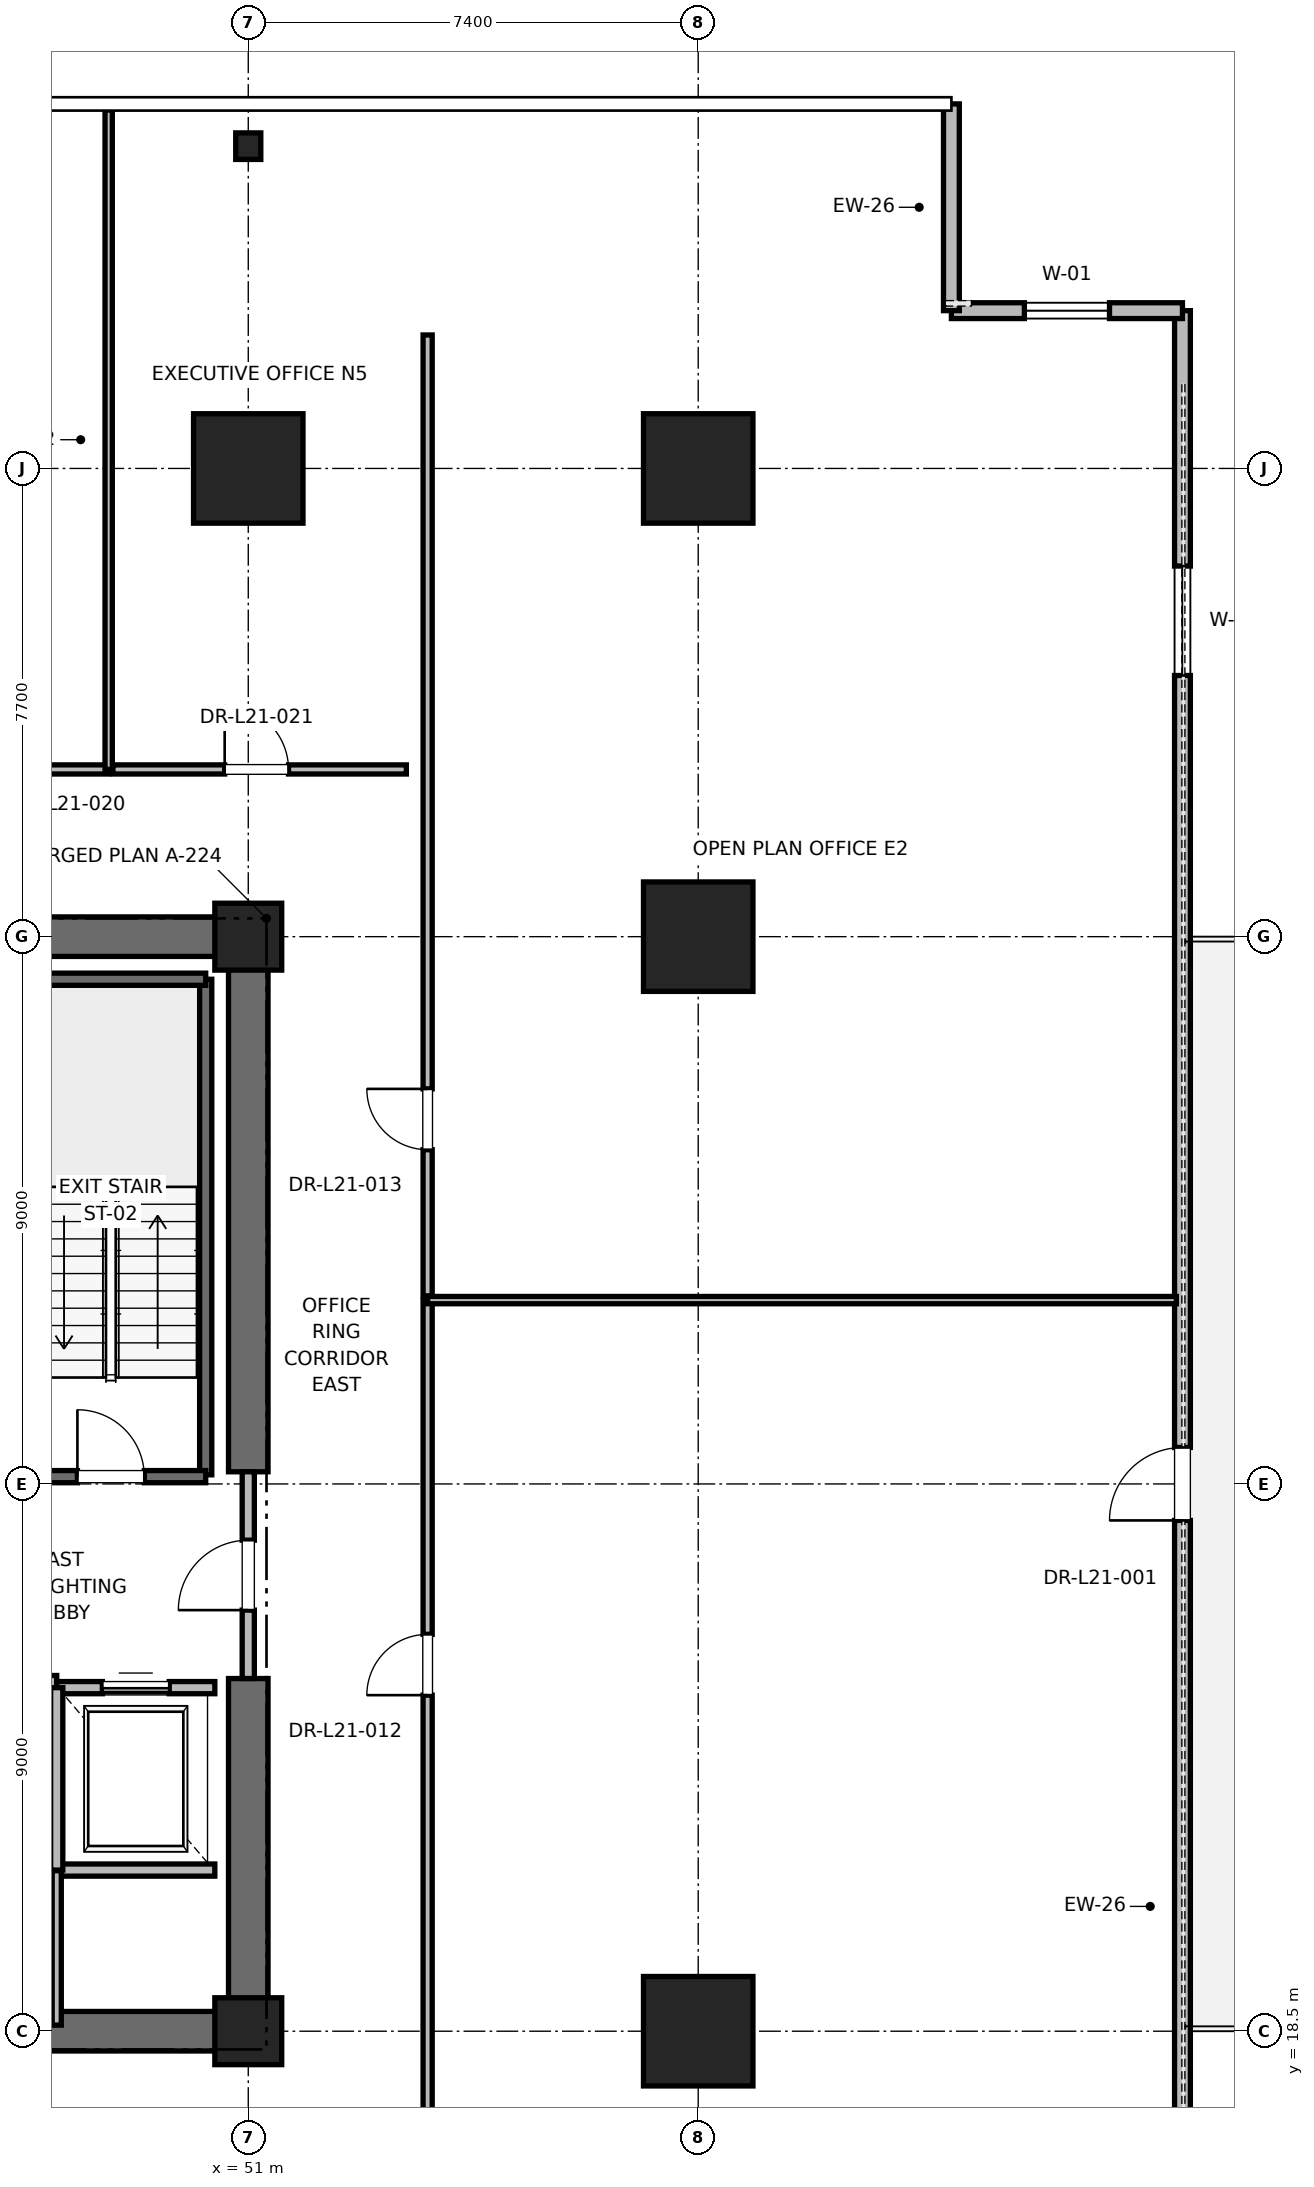
"""IFC4 building model, lengths in metres.
Left out: names, types, materials, properties, quantities, classifications, styles, units other than length and angle.
Written with IfcOpenShell. Run it as: python <this file> out.ifc"""

import sys

from ifc_helpers import new_model, si_unit, direction, frame, frame_2d, origin, origin_2d, place, context, subcontext, project, spatial, rectangle, i_section, extrude, element, fill, save


model = new_model("IFC4")
c1 = context("Model", 3, precision=1e-05, world=origin(), true_north=direction((0.0, 1.0)))
c2 = subcontext(c1, "Body", "Model", "MODEL_VIEW")
j1 = project(units=[si_unit("LENGTHUNIT", "METRE"), si_unit("PLANEANGLEUNIT", "RADIAN")], contexts=[c1])
p1 = place(None, origin())
s1 = spatial("IfcSite", under=j1, at=p1, CompositionType="ELEMENT")
p2 = place(p1, origin())
s2 = spatial("IfcBuilding", under=s1, at=p2, CompositionType="ELEMENT")
p3 = place(p2, frame((0.0, 0.0, 91.6)))
s3 = spatial("IfcBuildingStorey", under=s2, at=p3, CompositionType="ELEMENT", Elevation=91.6)
for number, where, z_axis, x_axis in (
    (1, (51.0, 44.2, 0.0), (0.0, 0.0, 1.0), (1.0, 0.0, 0.0)),
    (2, (58.4, 18.5, 0.0), (0.0, 0.0, 1.0), (1.0, 0.0, 0.0)),
    (3, (58.4, 36.5, 0.0), (0.0, 0.0, 1.0), (1.0, 0.0, 0.0)),
    (4, (58.4, 44.2, 0.0), (0.0, 0.0, 1.0), (1.0, 0.0, 0.0)),
):
    element("IfcColumn", number, at=place(p3, frame(where, z_axis=z_axis, x_axis=x_axis)), inside=s3, PredefinedType="COLUMN", context=c2, shape_type="SweptSolid", body=[
        extrude(rectangle(XDim=1.8, YDim=1.8, at=origin_2d()), origin(), (0.0, 0.0, 1.0), 4.0),
    ])
p4 = place(p3, frame((51.0, 49.5, 0.0), z_axis=(0.0, 0.0, 1.0), x_axis=(1.0, 0.0, 0.0)))
e5 = element("IfcColumn", 5, at=p4, inside=s3, PredefinedType="COLUMN", context=c2, shape_type="SweptSolid", body=[
    extrude(i_section(OverallWidth=0.412, OverallDepth=0.437, WebThickness=0.036, FlangeThickness=0.058, FilletRadius=0.015, at=origin_2d()), origin(), (0.0, 0.0, 1.0), 4.0),
])
for number, where, z_axis, x_axis in (
    (6, (51.0, 18.5, 0.0), (0.0, 0.0, 1.0), (1.0, 0.0, 0.0)),
    (7, (51.0, 36.5, 0.0), (0.0, 0.0, 1.0), (1.0, 0.0, 0.0)),
):
    element("IfcColumn", number, at=place(p3, frame(where, z_axis=z_axis, x_axis=x_axis)), inside=s3, PredefinedType="PILASTER", context=c2, shape_type="SweptSolid", body=[
        extrude(rectangle(XDim=1.1, YDim=1.1, at=origin_2d()), origin(), (0.0, 0.0, 1.0), 4.0),
    ])
p5 = place(p3, frame((41.8, 18.5, 0.0), z_axis=(0.0, 0.0, 1.0), x_axis=(1.0, 0.0, 0.0)))
e8 = element("IfcWall", 8, at=p5, inside=s3, PredefinedType="SHEAR", context=c2, shape_type="SweptSolid", body=[
    extrude(rectangle(XDim=9.2, YDim=0.65, at=frame_2d((4.6, 0.0))), origin(), (0.0, 0.0, 1.0), 3.76),
])
for number, where, z_axis, x_axis in (
    (9, (45.2, 36.5, 0.0), (0.0, 0.0, 1.0), (1.0, 0.0, 0.0)),
    (10, (51.0, 18.5, 0.0), (0.0, 0.0, 1.0), (0.0, 1.0, 0.0)),
):
    element("IfcWall", number, at=place(p3, frame(where, z_axis=z_axis, x_axis=x_axis)), inside=s3, PredefinedType="SHEAR", context=c2, shape_type="SweptSolid", body=[
        extrude(rectangle(XDim=5.8, YDim=0.65, at=frame_2d((2.9, 0.0))), origin(), (0.0, 0.0, 1.0), 3.76),
    ])
p6 = place(p3, frame((51.0, 27.7, 0.0), z_axis=(0.0, 0.0, 1.0), x_axis=(0.0, 1.0, 0.0)))
e11 = element("IfcWall", 11, at=p6, inside=s3, PredefinedType="SHEAR", context=c2, shape_type="SweptSolid", body=[
    extrude(rectangle(XDim=8.8, YDim=0.65, at=frame_2d((4.4, 0.0))), origin(), (0.0, 0.0, 1.0), 3.76),
])
p7 = place(p3, frame((66.364, 8.205, 0.0), z_axis=(0.0, 0.0, 1.0), x_axis=(0.0, 1.0, 0.0)))
e12 = element("IfcWall", 12, at=p7, inside=s3, PredefinedType="PARAPET", context=c2, shape_type="SweptSolid", body=[
    extrude(rectangle(XDim=38.59, YDim=0.26, at=frame_2d((19.295, 0.0))), origin(), (0.0, 0.0, 1.0), 2.889),
])
p8 = place(p7, frame((4.2, 0.0, 0.85)))
e13 = element("IfcOpeningElement", 13, at=p8, cuts=e12, PredefinedType="OPENING", context=c2, shape_type="SweptSolid", body=[
    extrude(rectangle(XDim=1.8, YDim=2.2, at=frame_2d((0.9, 1.1))), frame((0.0, 0.13, 0.0), z_axis=(0.0, -1.0, 0.0), x_axis=(1.0, 0.0, 0.0)), (0.0, 0.0, 1.0), 0.26),
])
p9 = place(p7, frame((18.695, 0.0, 0.0)))
e14 = element("IfcOpeningElement", 14, at=p9, cuts=e12, PredefinedType="OPENING", context=c2, shape_type="SweptSolid", body=[
    extrude(rectangle(XDim=1.2, YDim=2.2, at=frame_2d((0.6, 1.1))), frame((0.0, 0.13, 0.0), z_axis=(0.0, -1.0, 0.0), x_axis=(1.0, 0.0, 0.0)), (0.0, 0.0, 1.0), 0.26),
])
p10 = place(p7, frame((32.59, 0.0, 0.85)))
e15 = element("IfcOpeningElement", 15, at=p10, cuts=e12, PredefinedType="OPENING", context=c2, shape_type="SweptSolid", body=[
    extrude(rectangle(XDim=1.8, YDim=2.2, at=frame_2d((0.9, 1.1))), frame((0.0, 0.13, 0.0), z_axis=(0.0, -1.0, 0.0), x_axis=(1.0, 0.0, 0.0)), (0.0, 0.0, 1.0), 0.26),
])
p11 = place(p3, frame((66.364, 46.795, 0.0), z_axis=(0.0, 0.0, 1.0), x_axis=(-1.0, 0.0, 0.0)))
e16 = element("IfcWall", 16, at=p11, inside=s3, PredefinedType="PARAPET", context=c2, shape_type="SweptSolid", body=[
    extrude(rectangle(XDim=3.8, YDim=0.26, at=frame_2d((1.9, 0.0))), origin(), (0.0, 0.0, 1.0), 3.76),
])
p12 = place(p11, frame((1.2, 0.0, 0.85)))
e17 = element("IfcOpeningElement", 17, at=p12, cuts=e16, PredefinedType="OPENING", context=c2, shape_type="SweptSolid", body=[
    extrude(rectangle(XDim=1.4, YDim=2.0, at=frame_2d((0.7, 1.0))), frame((0.0, 0.13, 0.0), z_axis=(0.0, -1.0, 0.0), x_axis=(1.0, 0.0, 0.0)), (0.0, 0.0, 1.0), 0.26),
])
p13 = place(p3, frame((62.564, 46.795, 0.0), z_axis=(0.0, 0.0, 1.0), x_axis=(0.0, 1.0, 0.0)))
e18 = element("IfcWall", 18, at=p13, inside=s3, PredefinedType="PARAPET", context=c2, shape_type="SweptSolid", body=[
    extrude(rectangle(XDim=3.4, YDim=0.26, at=frame_2d((1.7, 0.0))), origin(), (0.0, 0.0, 1.0), 3.76),
])
p14 = place(p3, frame((50.3, 27.65, 0.0), z_axis=(0.0, 0.0, 1.0), x_axis=(0.0, 1.0, 0.0)))
e19 = element("IfcWall", 19, at=p14, inside=s3, PredefinedType="SOLIDWALL", context=c2, shape_type="SweptSolid", body=[
    extrude(rectangle(XDim=8.15, YDim=0.2, at=frame_2d((4.075, 0.0))), origin(), (0.0, 0.0, 1.0), 3.76),
])
p15 = place(p3, frame((47.18, 35.8, 0.0), z_axis=(0.0, 0.0, 1.0), x_axis=(1.0, 0.0, 0.0)))
e20 = element("IfcWall", 20, at=p15, inside=s3, PredefinedType="SOLIDWALL", context=c2, shape_type="SweptSolid", body=[
    extrude(rectangle(XDim=3.12, YDim=0.2, at=frame_2d((1.56, 0.0))), origin(), (0.0, 0.0, 1.0), 3.76),
])
p16 = place(p3, frame((47.18, 27.62, 0.0), z_axis=(0.0, 0.0, 1.0), x_axis=(1.0, 0.0, 0.0)))
e21 = element("IfcWall", 21, at=p16, inside=s3, PredefinedType="SOLIDWALL", context=c2, shape_type="SweptSolid", body=[
    extrude(rectangle(XDim=3.12, YDim=0.2, at=frame_2d((1.56, 0.0))), origin(), (0.0, 0.0, 1.0), 3.76),
])
p17 = place(p16, frame((1.01, 0.0, 0.0)))
e22 = element("IfcOpeningElement", 22, at=p17, cuts=e21, PredefinedType="OPENING", context=c2, shape_type="SweptSolid", body=[
    extrude(rectangle(XDim=1.1, YDim=2.15, at=frame_2d((0.55, 1.075))), frame((0.0, 0.1, 0.0), z_axis=(0.0, -1.0, 0.0), x_axis=(1.0, 0.0, 0.0)), (0.0, 0.0, 1.0), 0.2),
])
p18 = place(p3, frame((45.15, 24.25, 0.0), z_axis=(0.0, 0.0, 1.0), x_axis=(1.0, 0.0, 0.0)))
e23 = element("IfcWall", 23, at=p18, inside=s3, PredefinedType="PARTITIONING", context=c2, shape_type="SweptSolid", body=[
    extrude(rectangle(XDim=2.7, YDim=0.2, at=frame_2d((1.35, 0.0))), origin(), (0.0, 0.0, 1.0), 3.76),
])
p19 = place(p18, frame((0.775, 0.0, 0.0)))
e24 = element("IfcOpeningElement", 24, at=p19, cuts=e23, PredefinedType="OPENING", context=c2, shape_type="SweptSolid", body=[
    extrude(rectangle(XDim=1.15, YDim=2.2, at=frame_2d((0.575, 1.1))), frame((0.0, 0.1, 0.0), z_axis=(0.0, -1.0, 0.0), x_axis=(1.0, 0.0, 0.0)), (0.0, 0.0, 1.0), 0.2),
])
p20 = place(p3, frame((51.0, 24.3, 0.0), z_axis=(0.0, 0.0, 1.0), x_axis=(0.0, 1.0, 0.0)))
e25 = element("IfcWall", 25, at=p20, inside=s3, PredefinedType="PARTITIONING", context=c2, shape_type="SweptSolid", body=[
    extrude(rectangle(XDim=3.4, YDim=0.2, at=frame_2d((1.7, 0.0))), origin(), (0.0, 0.0, 1.0), 2.54),
])
p21 = place(p20, frame((1.125, 0.0, 0.0)))
e26 = element("IfcOpeningElement", 26, at=p21, cuts=e25, PredefinedType="OPENING", context=c2, shape_type="SweptSolid", body=[
    extrude(rectangle(XDim=1.15, YDim=2.2, at=frame_2d((0.575, 1.1))), frame((0.0, 0.1, 0.0), z_axis=(0.0, -1.0, 0.0), x_axis=(1.0, 0.0, 0.0)), (0.0, 0.0, 1.0), 0.2),
])
p22 = place(p3, frame((47.85, 21.15, 0.0), z_axis=(0.0, 0.0, 1.0), x_axis=(1.0, 0.0, 0.0)))
e27 = element("IfcWall", 27, at=p22, inside=s3, PredefinedType="SOLIDWALL", context=c2, shape_type="SweptSolid", body=[
    extrude(rectangle(XDim=2.6, YDim=0.2, at=frame_2d((1.3, 0.0))), origin(), (0.0, 0.0, 1.0), 3.76),
])
p23 = place(p3, frame((50.45, 24.15, 0.0), z_axis=(0.0, 0.0, 1.0), x_axis=(-1.0, 0.0, 0.0)))
e28 = element("IfcWall", 28, at=p23, inside=s3, PredefinedType="SOLIDWALL", context=c2, shape_type="SweptSolid", body=[
    extrude(rectangle(XDim=2.6, YDim=0.2, at=frame_2d((1.3, 0.0))), origin(), (0.0, 0.0, 1.0), 2.54),
])
p24 = place(p23, frame((0.75, 0.0, 0.0)))
e29 = element("IfcOpeningElement", 29, at=p24, cuts=e28, PredefinedType="OPENING", context=c2, shape_type="SweptSolid", body=[
    extrude(rectangle(XDim=1.1, YDim=2.2, at=frame_2d((0.55, 1.1))), frame((0.0, 0.1, 0.0), z_axis=(0.0, -1.0, 0.0), x_axis=(1.0, 0.0, 0.0)), (0.0, 0.0, 1.0), 0.2),
])
p25 = place(p3, frame((47.85, 24.15, 0.0), z_axis=(0.0, 0.0, 1.0), x_axis=(0.0, -1.0, 0.0)))
e30 = element("IfcWall", 30, at=p25, inside=s3, PredefinedType="SOLIDWALL", context=c2, shape_type="SweptSolid", body=[
    extrude(rectangle(XDim=3.0, YDim=0.2, at=frame_2d((1.5, 0.0))), origin(), (0.0, 0.0, 1.0), 3.76),
])
p26 = place(p3, frame((47.85, 18.6, 0.0), z_axis=(0.0, 0.0, 1.0), x_axis=(0.0, 1.0, 0.0)))
e31 = element("IfcWall", 31, at=p26, inside=s3, PredefinedType="PARTITIONING", context=c2, shape_type="SweptSolid", body=[
    extrude(rectangle(XDim=2.54, YDim=0.15, at=frame_2d((1.27, 0.0))), origin(), (0.0, 0.0, 1.0), 2.85),
])
p27 = place(p3, frame((43.334, 39.25, 0.0), z_axis=(0.0, 0.0, 1.0), x_axis=(1.0, 0.0, 0.0)))
e32 = element("IfcWall", 32, at=p27, inside=s3, PredefinedType="PARTITIONING", context=c2, shape_type="SweptSolid", body=[
    extrude(rectangle(XDim=5.37, YDim=0.15, at=frame_2d((2.685, 0.0))), origin(), (0.0, 0.0, 1.0), 2.85),
])
p28 = place(p27, frame((2.15, 0.0, 0.0)))
e33 = element("IfcOpeningElement", 33, at=p28, cuts=e32, PredefinedType="OPENING", context=c2, shape_type="SweptSolid", body=[
    extrude(rectangle(XDim=1.0, YDim=2.15, at=frame_2d((0.5, 1.075))), frame((0.0, 0.075, 0.0), z_axis=(0.0, -1.0, 0.0), x_axis=(1.0, 0.0, 0.0)), (0.0, 0.0, 1.0), 0.15),
])
p29 = place(p3, frame((48.704, 39.25, 0.0), z_axis=(0.0, 0.0, 1.0), x_axis=(0.0, 1.0, 0.0)))
e34 = element("IfcWall", 34, at=p29, inside=s3, PredefinedType="PARTITIONING", context=c2, shape_type="SweptSolid", body=[
    extrude(rectangle(XDim=10.845, YDim=0.12, at=frame_2d((5.422, 0.0))), origin(), (0.0, 0.0, 1.0), 2.39),
])
p30 = place(p3, frame((48.774, 39.25, 0.0), z_axis=(0.0, 0.0, 1.0), x_axis=(1.0, 0.0, 0.0)))
e35 = element("IfcWall", 35, at=p30, inside=s3, PredefinedType="PARTITIONING", context=c2, shape_type="SweptSolid", body=[
    extrude(rectangle(XDim=4.826, YDim=0.15, at=frame_2d((2.413, 0.0))), origin(), (0.0, 0.0, 1.0), 2.85),
])
p31 = place(p30, frame((1.838, 0.0, 0.0)))
e36 = element("IfcOpeningElement", 36, at=p31, cuts=e35, PredefinedType="OPENING", context=c2, shape_type="SweptSolid", body=[
    extrude(rectangle(XDim=1.05, YDim=2.2, at=frame_2d((0.525, 1.1))), frame((0.0, 0.075, 0.0), z_axis=(0.0, -1.0, 0.0), x_axis=(1.0, 0.0, 0.0)), (0.0, 0.0, 1.0), 0.15),
])
p32 = place(p3, frame((53.95, 8.605, 0.0), z_axis=(0.0, 0.0, 1.0), x_axis=(0.0, 1.0, 0.0)))
e37 = element("IfcWall", 37, at=p32, inside=s3, PredefinedType="PARTITIONING", context=c2, shape_type="SweptSolid", body=[
    extrude(rectangle(XDim=21.918, YDim=0.15, at=frame_2d((10.959, 0.0))), origin(), (0.0, 0.0, 1.0), 2.85),
])
p33 = place(p32, frame((15.421, 0.0, 0.0)))
e38 = element("IfcOpeningElement", 38, at=p33, cuts=e37, PredefinedType="OPENING", context=c2, shape_type="SweptSolid", body=[
    extrude(rectangle(XDim=1.0, YDim=2.15, at=frame_2d((0.5, 1.075))), frame((0.0, 0.075, 0.0), z_axis=(0.0, -1.0, 0.0), x_axis=(1.0, 0.0, 0.0)), (0.0, 0.0, 1.0), 0.15),
])
p34 = place(p3, frame((53.95, 30.523, 0.0), z_axis=(0.0, 0.0, 1.0), x_axis=(1.0, 0.0, 0.0)))
e39 = element("IfcWall", 39, at=p34, inside=s3, PredefinedType="PARTITIONING", context=c2, shape_type="SweptSolid", body=[
    extrude(rectangle(XDim=12.314, YDim=0.12, at=frame_2d((6.157, 0.0))), origin(), (0.0, 0.0, 1.0), 2.85),
])
p35 = place(p3, frame((53.95, 30.593, 0.0), z_axis=(0.0, 0.0, 1.0), x_axis=(0.0, 1.0, 0.0)))
e40 = element("IfcWall", 40, at=p35, inside=s3, PredefinedType="PARTITIONING", context=c2, shape_type="SweptSolid", body=[
    extrude(rectangle(XDim=15.802, YDim=0.15, at=frame_2d((7.901, 0.0))), origin(), (0.0, 0.0, 1.0), 2.85),
])
p36 = place(p35, frame((2.403, 0.0, 0.0)))
e41 = element("IfcOpeningElement", 41, at=p36, cuts=e40, PredefinedType="OPENING", context=c2, shape_type="SweptSolid", body=[
    extrude(rectangle(XDim=1.0, YDim=2.15, at=frame_2d((0.5, 1.075))), frame((0.0, 0.075, 0.0), z_axis=(0.0, -1.0, 0.0), x_axis=(1.0, 0.0, 0.0)), (0.0, 0.0, 1.0), 0.15),
])
p37 = place(p9, origin())
e42 = element("IfcDoor", 42, at=p37, inside=s3, OperationType="SINGLE_SWING_LEFT", PredefinedType="DOOR", context=c2, shape_type="SweptSolid", body=[
    extrude(rectangle(XDim=1.2, YDim=2.2, at=frame_2d((0.6, 1.1))), frame((0.0, 0.025, 0.0), z_axis=(0.0, -1.0, 0.0), x_axis=(1.0, 0.0, 0.0)), (0.0, 0.0, 1.0), 0.05),
])
fill(e14, e42)
p38 = place(p10, origin())
e43 = element("IfcWindow", 43, at=p38, inside=s3, PartitioningType="SINGLE_PANEL", PredefinedType="WINDOW", context=c2, shape_type="SweptSolid", body=[
    extrude(rectangle(XDim=1.8, YDim=2.2, at=frame_2d((0.9, 1.1))), frame((0.0, 0.03, 0.0), z_axis=(0.0, -1.0, 0.0), x_axis=(1.0, 0.0, 0.0)), (0.0, 0.0, 1.0), 0.06),
])
fill(e15, e43)
p39 = place(p12, origin())
e44 = element("IfcWindow", 44, at=p39, inside=s3, PartitioningType="SINGLE_PANEL", PredefinedType="WINDOW", context=c2, shape_type="SweptSolid", body=[
    extrude(rectangle(XDim=1.4, YDim=2.0, at=frame_2d((0.7, 1.0))), frame((0.0, 0.03, 0.0), z_axis=(0.0, -1.0, 0.0), x_axis=(1.0, 0.0, 0.0)), (0.0, 0.0, 1.0), 0.06),
])
fill(e17, e44)
p40 = place(p17, origin())
e45 = element("IfcDoor", 45, at=p40, inside=s3, OperationType="SINGLE_SWING_LEFT", PredefinedType="DOOR", context=c2, shape_type="SweptSolid", body=[
    extrude(rectangle(XDim=1.1, YDim=2.15, at=frame_2d((0.55, 1.075))), frame((0.0, 0.025, 0.0), z_axis=(0.0, -1.0, 0.0), x_axis=(1.0, 0.0, 0.0)), (0.0, 0.0, 1.0), 0.05),
])
fill(e22, e45)
p41 = place(p21, origin())
e46 = element("IfcDoor", 46, at=p41, inside=s3, OperationType="SINGLE_SWING_LEFT", PredefinedType="DOOR", context=c2, shape_type="SweptSolid", body=[
    extrude(rectangle(XDim=1.15, YDim=2.2, at=frame_2d((0.575, 1.1))), frame((0.0, 0.025, 0.0), z_axis=(0.0, -1.0, 0.0), x_axis=(1.0, 0.0, 0.0)), (0.0, 0.0, 1.0), 0.05),
])
fill(e26, e46)
p42 = place(p24, origin())
e47 = element("IfcDoor", 47, at=p42, inside=s3, OperationType="SLIDING_TO_RIGHT", PredefinedType="DOOR", context=c2, shape_type="SweptSolid", body=[
    extrude(rectangle(XDim=1.1, YDim=2.2, at=frame_2d((0.55, 1.1))), frame((0.0, 0.025, 0.0), z_axis=(0.0, -1.0, 0.0), x_axis=(1.0, 0.0, 0.0)), (0.0, 0.0, 1.0), 0.05),
])
fill(e29, e47)
p43 = place(p31, origin())
e48 = element("IfcDoor", 48, at=p43, inside=s3, OperationType="SINGLE_SWING_LEFT", PredefinedType="DOOR", context=c2, shape_type="SweptSolid", body=[
    extrude(rectangle(XDim=1.05, YDim=2.2, at=frame_2d((0.525, 1.1))), frame((0.0, 0.025, 0.0), z_axis=(0.0, -1.0, 0.0), x_axis=(1.0, 0.0, 0.0)), (0.0, 0.0, 1.0), 0.05),
])
fill(e36, e48)
p44 = place(p33, origin())
e49 = element("IfcDoor", 49, at=p44, inside=s3, OperationType="SINGLE_SWING_LEFT", PredefinedType="DOOR", context=c2, shape_type="SweptSolid", body=[
    extrude(rectangle(XDim=1.0, YDim=2.15, at=frame_2d((0.5, 1.075))), frame((0.0, 0.025, 0.0), z_axis=(0.0, -1.0, 0.0), x_axis=(1.0, 0.0, 0.0)), (0.0, 0.0, 1.0), 0.05),
])
fill(e38, e49)
p45 = place(p36, origin())
e50 = element("IfcDoor", 50, at=p45, inside=s3, OperationType="SINGLE_SWING_RIGHT", PredefinedType="DOOR", context=c2, shape_type="SweptSolid", body=[
    extrude(rectangle(XDim=1.0, YDim=2.15, at=frame_2d((0.5, 1.075))), frame((0.0, 0.025, 0.0), z_axis=(0.0, -1.0, 0.0), x_axis=(1.0, 0.0, 0.0)), (0.0, 0.0, 1.0), 0.05),
])
fill(e41, e50)
save(model, sys.argv[1])
